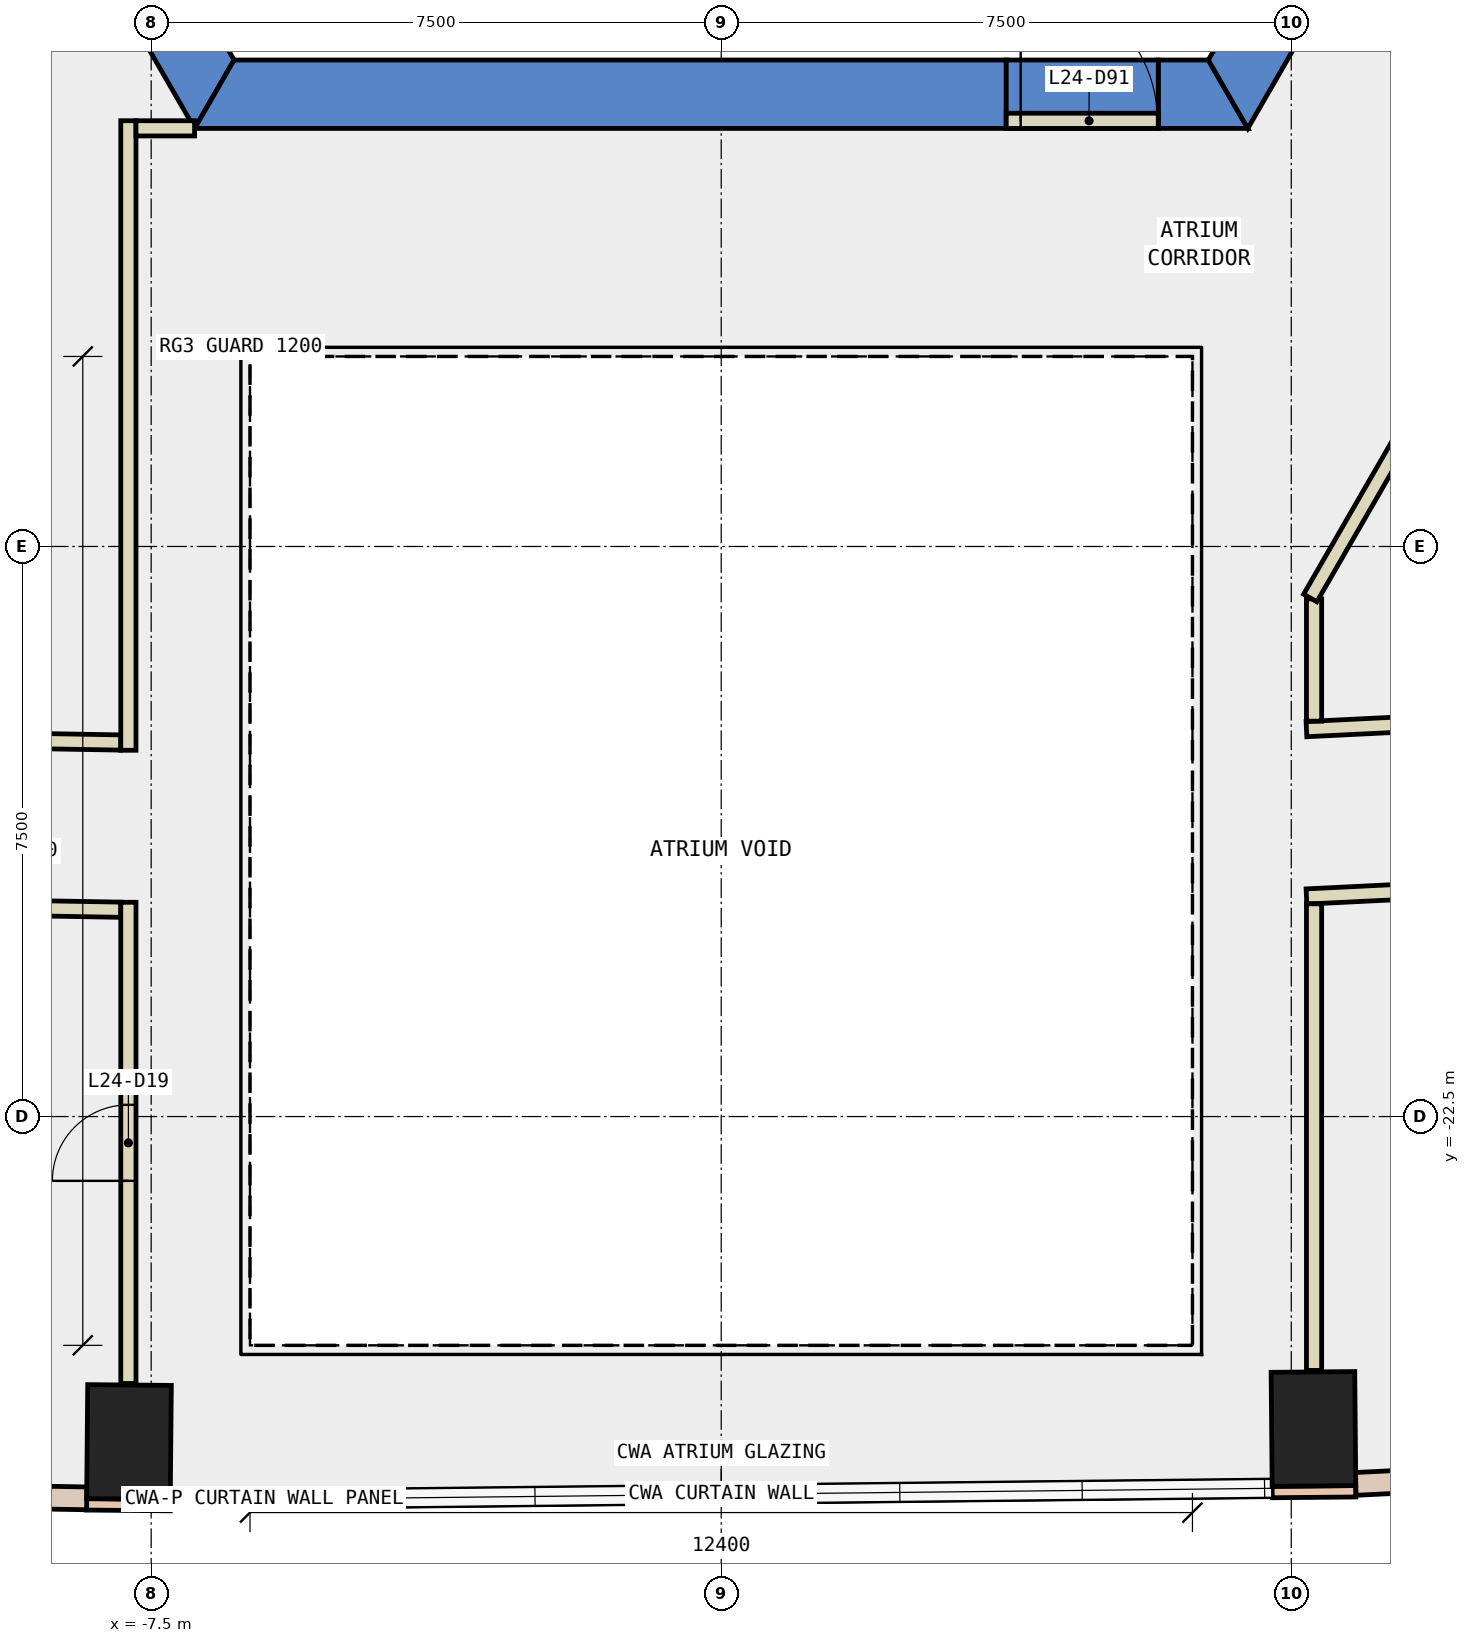
"""IFC4 building model, lengths in metres.
Left out: names, types, materials, properties, quantities, classifications, styles, units other than length and angle.
Written with IfcOpenShell. Run it as: python <this file> out.ifc"""

import sys

from ifc_helpers import new_model, si_unit, direction, frame, frame_2d, origin, origin_2d, place, context, subcontext, project, spatial, polyline, rectangle, outline, extrude, element, fill, save


model = new_model("IFC4")
c1 = context("Model", 3, precision=1e-05, world=origin(), true_north=direction((0.0, 1.0)))
c2 = subcontext(c1, "Body", "Model", "MODEL_VIEW")
j1 = project(units=[si_unit("LENGTHUNIT", "METRE"), si_unit("PLANEANGLEUNIT", "RADIAN")], contexts=[c1])
p1 = place(None, origin())
s1 = spatial("IfcSite", under=j1, at=p1, CompositionType="ELEMENT")
p2 = place(p1, origin())
s2 = spatial("IfcBuilding", under=s1, at=p2, CompositionType="ELEMENT")
p3 = place(p2, frame((0.0, 0.0, 111.8)))
s3 = spatial("IfcBuildingStorey", under=s2, at=p3, CompositionType="ELEMENT", Elevation=111.8)
for number, where, z_axis, x_axis in (
    (1, (-7.792, -26.782, -0.4), (0.0, 0.0, 1.0), (-1.0, 0.009, 0.0)),
    (2, (7.792, -26.61, -0.4), (0.0, 0.0, 1.0), (1.0, 0.009, 0.0)),
):
    element("IfcColumn", number, at=place(p3, frame(where, z_axis=z_axis, x_axis=x_axis)), inside=s3, PredefinedType="COLUMN", context=c2, shape_type="SweptSolid", body=[
        extrude(rectangle(XDim=1.1, YDim=1.5, at=origin_2d()), origin(), (0.0, 0.0, 1.0), 4.2),
    ])
p4 = place(p3, frame((0.0, 0.0, -0.4)))
e3 = element("IfcWall", 3, at=p4, inside=s3, PredefinedType="SHEAR", context=c2, shape_type="SweptSolid", body=[
    extrude(outline(polyline([(-13.856, 2.5), (-6.928, -9.5), (-6.409, -8.6), (-12.817, 2.5), (-13.856, 2.5)])), origin(), (0.0, 0.0, 1.0), 4.2),
])
p5 = place(p3, frame((0.0, 0.0, -0.4)))
e4 = element("IfcWall", 4, at=p5, inside=s3, PredefinedType="SHEAR", context=c2, shape_type="SweptSolid", body=[
    extrude(outline(polyline([(3.75, -9.5), (3.75, -8.6), (-6.409, -8.6), (-6.928, -9.5), (3.75, -9.5)])), origin(), (0.0, 0.0, 1.0), 4.2),
])
p6 = place(p3, frame((0.0, 0.0, -0.4)))
e5 = element("IfcWall", 5, at=p6, inside=s3, PredefinedType="SHEAR", context=c2, shape_type="SweptSolid", body=[
    extrude(outline(polyline([(5.75, -8.6), (5.75, -9.5), (6.928, -9.5), (6.409, -8.6), (5.75, -8.6)])), origin(), (0.0, 0.0, 1.0), 4.2),
])
p7 = place(p3, frame((0.0, 0.0, 3.6)))
e6 = element("IfcWall", 6, at=p7, inside=s3, PredefinedType="SHEAR", context=c2, shape_type="SweptSolid", body=[
    extrude(outline(polyline([(5.75, -9.5), (5.75, -8.6), (3.75, -8.6), (3.75, -9.5), (5.75, -9.5)])), origin(), (0.0, 0.0, 1.0), 0.2),
])
p8 = place(p3, frame((0.0, 0.0, -0.4)))
e7 = element("IfcWall", 7, at=p8, inside=s3, PredefinedType="SHEAR", context=c2, shape_type="SweptSolid", body=[
    extrude(outline(polyline([(8.117, -7.44), (7.338, -6.99), (6.409, -8.6), (6.928, -9.5), (8.117, -7.44)])), origin(), (0.0, 0.0, 1.0), 4.2),
])
for number, where, z_axis, x_axis in (
    (8, (-8.349, -27.602, 0.0), (0.0, 0.0, 1.0), (1.0, -0.009, 0.0)),
    (9, (7.249, -27.44, 0.0), (0.0, 0.0, 1.0), (1.0, 0.009, 0.0)),
):
    element("IfcWall", number, at=place(p3, frame(where, z_axis=z_axis, x_axis=x_axis)), inside=s3, PredefinedType="STANDARD", context=c2, shape_type="SweptSolid", body=[
        extrude(rectangle(XDim=1.1, YDim=0.15, at=frame_2d((0.55, 0.0))), origin(), (0.0, 0.0, 1.0), 3.8),
    ])
p9 = place(p3, frame((-14.242, -27.421, 0.0), z_axis=(0.0, 0.0, 1.0), x_axis=(0.999850142513, -0.017311629508, 0.0)))
e10 = element("IfcWall", 10, at=p9, inside=s3, PredefinedType="STANDARD", context=c2, shape_type="SweptSolid", body=[
    extrude(rectangle(XDim=5.895, YDim=0.3, at=frame_2d((2.948, 0.0))), origin(), (0.0, 0.0, 1.0), 3.8),
])
p10 = place(p9, frame((0.474, 0.0, 0.9)))
e11 = element("IfcOpeningElement", 11, at=p10, cuts=e10, PredefinedType="OPENING", context=c2, shape_type="SweptSolid", body=[
    extrude(rectangle(XDim=2.0, YDim=2.6, at=frame_2d((1.0, 1.3))), frame((0.0, 0.16, 0.0), z_axis=(0.0, -1.0, 0.0), x_axis=(1.0, 0.0, 0.0)), (0.0, 0.0, 1.0), 0.32),
])
p11 = place(p9, frame((3.421, 0.0, 0.9)))
e12 = element("IfcOpeningElement", 12, at=p11, cuts=e10, PredefinedType="OPENING", context=c2, shape_type="SweptSolid", body=[
    extrude(rectangle(XDim=2.0, YDim=2.6, at=frame_2d((1.0, 1.3))), frame((0.0, 0.16, 0.0), z_axis=(0.0, -1.0, 0.0), x_axis=(1.0, 0.0, 0.0)), (0.0, 0.0, 1.0), 0.32),
])
p12 = place(p3, frame((8.347, -27.333, 0.0), z_axis=(0.0, 0.0, 1.0), x_axis=(0.998800343021, 0.048968099633, 0.0)))
e13 = element("IfcWall", 13, at=p12, inside=s3, PredefinedType="STANDARD", context=c2, shape_type="SweptSolid", body=[
    extrude(rectangle(XDim=5.903, YDim=0.3, at=frame_2d((2.952, 0.0))), origin(), (0.0, 0.0, 1.0), 3.8),
])
p13 = place(p12, frame((0.476, 0.0, 0.9)))
e14 = element("IfcOpeningElement", 14, at=p13, cuts=e13, PredefinedType="OPENING", context=c2, shape_type="SweptSolid", body=[
    extrude(rectangle(XDim=2.0, YDim=2.6, at=frame_2d((1.0, 1.3))), frame((0.0, 0.16, 0.0), z_axis=(0.0, -1.0, 0.0), x_axis=(1.0, 0.0, 0.0)), (0.0, 0.0, 1.0), 0.32),
])
p14 = place(p12, frame((3.427, 0.0, 0.9)))
e15 = element("IfcOpeningElement", 15, at=p14, cuts=e13, PredefinedType="OPENING", context=c2, shape_type="SweptSolid", body=[
    extrude(rectangle(XDim=2.0, YDim=2.6, at=frame_2d((1.0, 1.3))), frame((0.0, 0.16, 0.0), z_axis=(0.0, -1.0, 0.0), x_axis=(1.0, 0.0, 0.0)), (0.0, 0.0, 1.0), 0.32),
])
p15 = place(p3, frame((7.7, -17.403, 0.0), z_axis=(0.0, 0.0, 1.0), x_axis=(0.998792748077, 0.049122768543, 0.0)))
e16 = element("IfcWall", 16, at=p15, inside=s3, PredefinedType="PARTITIONING", context=c2, shape_type="SweptSolid", body=[
    extrude(rectangle(XDim=6.62, YDim=0.2, at=frame_2d((3.31, 0.0))), origin(), (0.0, 0.0, 1.0), 3.8),
])
p16 = place(p3, frame((-14.569, -17.464, 0.0), z_axis=(0.0, 0.0, 1.0), x_axis=(0.999851389672, -0.017239448129, 0.0)))
e17 = element("IfcWall", 17, at=p16, inside=s3, PredefinedType="PARTITIONING", context=c2, shape_type="SweptSolid", body=[
    extrude(rectangle(XDim=6.67, YDim=0.2, at=frame_2d((3.335, 0.0))), origin(), (0.0, 0.0, 1.0), 3.8),
])
p17 = place(p3, frame((14.418, -19.276, 0.0), z_axis=(0.0, 0.0, 1.0), x_axis=(-0.998802248261, -0.04892922305, 0.0)))
e18 = element("IfcWall", 18, at=p17, inside=s3, PredefinedType="PARTITIONING", context=c2, shape_type="SweptSolid", body=[
    extrude(rectangle(XDim=6.726, YDim=0.2, at=frame_2d((3.363, 0.0))), origin(), (0.0, 0.0, 1.0), 3.8),
])
p18 = place(p3, frame((-7.9, -19.779, 0.0), z_axis=(0.0, 0.0, 1.0), x_axis=(-0.999851582532, 0.017228259004, 0.0)))
e19 = element("IfcWall", 19, at=p18, inside=s3, PredefinedType="PARTITIONING", context=c2, shape_type="SweptSolid", body=[
    extrude(rectangle(XDim=3.188, YDim=0.2, at=frame_2d((1.594, 0.0))), origin(), (0.0, 0.0, 1.0), 3.8),
])
p19 = place(p3, frame((7.8, -15.69, 0.0), z_axis=(0.0, 0.0, 1.0), x_axis=(0.0, -1.0, 0.0)))
e20 = element("IfcWall", 20, at=p19, inside=s3, PredefinedType="PARTITIONING", context=c2, shape_type="SweptSolid", body=[
    extrude(rectangle(XDim=1.608, YDim=0.2, at=frame_2d((0.804, 0.0))), origin(), (0.0, 0.0, 1.0), 3.8),
])
p20 = place(p3, frame((-7.8, -17.681, 0.0), z_axis=(0.0, 0.0, 1.0), x_axis=(0.0, 1.0, 0.0)))
e21 = element("IfcWall", 21, at=p20, inside=s3, PredefinedType="PARTITIONING", context=c2, shape_type="SweptSolid", body=[
    extrude(rectangle(XDim=8.282, YDim=0.2, at=frame_2d((4.141, 0.0))), origin(), (0.0, 0.0, 1.0), 3.8),
])
p21 = place(p3, frame((-7.7, -9.499, 0.0), z_axis=(0.0, 0.0, 1.0), x_axis=(1.0, 0.0, 0.0)))
e22 = element("IfcWall", 22, at=p21, inside=s3, PredefinedType="PARTITIONING", context=c2, shape_type="SweptSolid", body=[
    extrude(rectangle(XDim=0.771, YDim=0.2, at=frame_2d((0.385, 0.0))), origin(), (0.0, 0.0, 1.0), 3.8),
])
p22 = place(p3, frame((7.8, -19.701, 0.0), z_axis=(0.0, 0.0, 1.0), x_axis=(0.0, -1.0, 0.0)))
e23 = element("IfcWall", 23, at=p22, inside=s3, PredefinedType="PARTITIONING", context=c2, shape_type="SweptSolid", body=[
    extrude(rectangle(XDim=6.139, YDim=0.2, at=frame_2d((3.07, 0.0))), origin(), (0.0, 0.0, 1.0), 3.8),
])
p23 = place(p3, frame((-7.8, -26.012, 0.0), z_axis=(0.0, 0.0, 1.0), x_axis=(0.0, 1.0, 0.0)))
e24 = element("IfcWall", 24, at=p23, inside=s3, PredefinedType="PARTITIONING", context=c2, shape_type="SweptSolid", body=[
    extrude(rectangle(XDim=6.331, YDim=0.2, at=frame_2d((3.166, 0.0))), origin(), (0.0, 0.0, 1.0), 3.8),
])
p24 = place(p23, frame((2.666, 0.0, 0.0)))
e25 = element("IfcOpeningElement", 25, at=p24, cuts=e24, PredefinedType="OPENING", context=c2, shape_type="SweptSolid", body=[
    extrude(rectangle(XDim=1.0, YDim=2.1, at=frame_2d((0.5, 1.05))), frame((0.0, 0.11, 0.0), z_axis=(0.0, -1.0, 0.0), x_axis=(1.0, 0.0, 0.0)), (0.0, 0.0, 1.0), 0.22),
])
p25 = place(p3, frame((3.75, -9.4, 0.0), z_axis=(0.0, 0.0, 1.0), x_axis=(1.0, 0.0, 0.0)))
e26 = element("IfcWall", 26, at=p25, inside=s3, PredefinedType="PARTITIONING", context=c2, shape_type="SweptSolid", body=[
    extrude(rectangle(XDim=2.0, YDim=0.2, at=frame_2d((1.0, 0.0))), origin(), (0.0, 0.0, 1.0), 2.4),
])
p26 = place(p25, frame((0.19, 0.0, 0.0)))
e27 = element("IfcOpeningElement", 27, at=p26, cuts=e26, PredefinedType="OPENING", context=c2, shape_type="SweptSolid", body=[
    extrude(rectangle(XDim=1.8, YDim=2.1, at=frame_2d((0.9, 1.05))), frame((0.0, 0.11, 0.0), z_axis=(0.0, -1.0, 0.0), x_axis=(1.0, 0.0, 0.0)), (0.0, 0.0, 1.0), 0.22),
])
p27 = place(p3, frame((12.401, -7.621, 0.0), z_axis=(0.0, 0.0, 1.0), x_axis=(-0.499983724212, -0.866034800411, 0.0)))
e28 = element("IfcWall", 28, at=p27, inside=s3, PredefinedType="PARTITIONING", context=c2, shape_type="SweptSolid", body=[
    extrude(rectangle(XDim=9.302, YDim=0.2, at=frame_2d((4.651, 0.0))), origin(), (0.0, 0.0, 1.0), 3.8),
])
p28 = place(p24, origin())
e29 = element("IfcDoor", 29, at=p28, inside=s3, OperationType="SINGLE_SWING_LEFT", PredefinedType="DOOR", context=c2, shape_type="SweptSolid", body=[
    extrude(rectangle(XDim=1.0, YDim=2.1, at=frame_2d((0.5, 1.05))), frame((0.0, 0.025, 0.0), z_axis=(0.0, -1.0, 0.0), x_axis=(1.0, 0.0, 0.0)), (0.0, 0.0, 1.0), 0.05),
])
fill(e25, e29)
p29 = place(p26, origin())
e30 = element("IfcDoor", 30, at=p29, inside=s3, OperationType="DOUBLE_DOOR_SINGLE_SWING", PredefinedType="DOOR", context=c2, shape_type="SweptSolid", body=[
    extrude(rectangle(XDim=1.8, YDim=2.1, at=frame_2d((0.9, 1.05))), frame((0.0, 0.025, 0.0), z_axis=(0.0, -1.0, 0.0), x_axis=(1.0, 0.0, 0.0)), (0.0, 0.0, 1.0), 0.05),
])
fill(e27, e30)
save(model, sys.argv[1])
